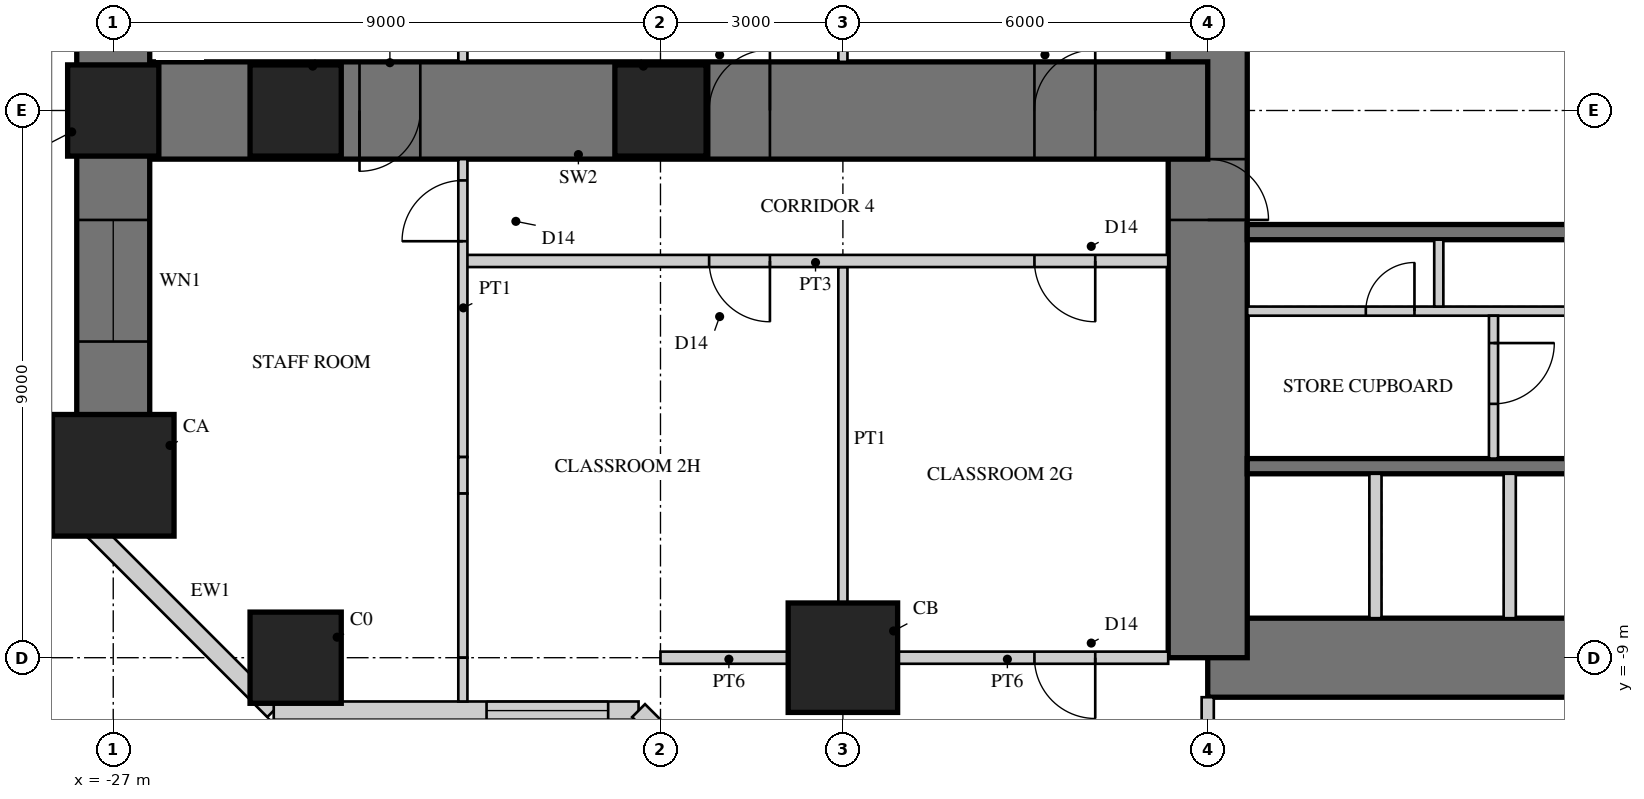
"""IFC4 building model, lengths in metres.
Left out: names, types, materials, properties, quantities, classifications, styles, units other than length and angle.
Written with IfcOpenShell. Run it as: python <this file> out.ifc"""

import sys

from ifc_helpers import new_model, si_unit, direction, frame, frame_2d, origin, origin_2d, place, context, subcontext, project, spatial, rectangle, hollow_rectangle, extrude, element, fill, save


model = new_model("IFC4")
c1 = context("Model", 3, precision=1e-05, world=origin(), true_north=direction((0.0, 1.0)))
c2 = subcontext(c1, "Body", "Model", "MODEL_VIEW")
j1 = project(units=[si_unit("LENGTHUNIT", "METRE"), si_unit("PLANEANGLEUNIT", "RADIAN")], contexts=[c1])
p1 = place(None, origin())
s1 = spatial("IfcSite", under=j1, at=p1, CompositionType="ELEMENT")
p2 = place(p1, origin())
s2 = spatial("IfcBuilding", under=s1, at=p2, CompositionType="ELEMENT")
p3 = place(p2, frame((0.0, 0.0, 9.5)))
s3 = spatial("IfcBuildingStorey", under=s2, at=p3, CompositionType="ELEMENT", Elevation=9.5)
p4 = place(p3, frame((-9.0, -9.0, 0.0), z_axis=(0.0, 0.0, 1.0), x_axis=(1.0, 0.0, 0.0)))
e1 = element("IfcWall", 1, at=p4, inside=s3, PredefinedType="SHEAR", context=c2, shape_type="SweptSolid", body=[
    extrude(rectangle(XDim=18.0, YDim=1.3, at=frame_2d((9.0, 0.0))), origin(), (0.0, 0.0, 1.0), 4.5),
])
p5 = place(p4, frame((9.8, 0.0, 0.0)))
e2 = element("IfcOpeningElement", 2, at=p5, cuts=e1, PredefinedType="OPENING", context=c2, shape_type="SweptSolid", body=[
    extrude(rectangle(XDim=1.0, YDim=2.4, at=frame_2d((0.5, 1.2))), frame((0.0, 0.66, 0.0), z_axis=(0.0, -1.0, 0.0), x_axis=(1.0, 0.0, 0.0)), (0.0, 0.0, 1.0), 1.32),
])
p6 = place(p3, frame((-9.0, 9.0, 0.0), z_axis=(0.0, 0.0, 1.0), x_axis=(0.0, -1.0, 0.0)))
e3 = element("IfcWall", 3, at=p6, inside=s3, PredefinedType="SHEAR", context=c2, shape_type="SweptSolid", body=[
    extrude(rectangle(XDim=18.0, YDim=1.3, at=frame_2d((9.0, 0.0))), origin(), (0.0, 0.0, 1.0), 4.5),
])
p7 = place(p6, frame((9.8, 0.0, 0.0)))
e4 = element("IfcOpeningElement", 4, at=p7, cuts=e3, PredefinedType="OPENING", context=c2, shape_type="SweptSolid", body=[
    extrude(rectangle(XDim=1.0, YDim=2.4, at=frame_2d((0.5, 1.2))), frame((0.0, 0.66, 0.0), z_axis=(0.0, -1.0, 0.0), x_axis=(1.0, 0.0, 0.0)), (0.0, 0.0, 1.0), 1.32),
])
for number, where, z_axis, x_axis in (
    (5, (-1.925, -2.0, 0.0), (0.0, 0.0, 1.0), (-1.0, 0.0, 0.0)),
    (6, (-1.925, -5.85, 0.0), (0.0, 0.0, 1.0), (-1.0, 0.0, 0.0)),
):
    element("IfcWall", number, at=place(p3, frame(where, z_axis=z_axis, x_axis=x_axis)), inside=s3, PredefinedType="SHEAR", context=c2, shape_type="SweptSolid", body=[
        extrude(rectangle(XDim=6.425, YDim=0.25, at=frame_2d((3.212, 0.0))), origin(), (0.0, 0.0, 1.0), 4.5),
    ])
p8 = place(p3, frame((-1.925, -3.3, 0.0), z_axis=(0.0, 0.0, 1.0), x_axis=(-1.0, 0.0, 0.0)))
e7 = element("IfcWall", 7, at=p8, inside=s3, PredefinedType="PARTITIONING", context=c2, shape_type="SweptSolid", body=[
    extrude(rectangle(XDim=6.425, YDim=0.15, at=frame_2d((3.212, 0.0))), origin(), (0.0, 0.0, 1.0), 4.5),
])
p9 = place(p8, frame((0.075, 0.0, 0.0)))
e8 = element("IfcOpeningElement", 8, at=p9, cuts=e7, PredefinedType="OPENING", context=c2, shape_type="SweptSolid", body=[
    extrude(rectangle(XDim=0.8, YDim=2.1, at=frame_2d((0.4, 1.05))), frame((0.0, 0.085, 0.0), z_axis=(0.0, -1.0, 0.0), x_axis=(1.0, 0.0, 0.0)), (0.0, 0.0, 1.0), 0.17),
])
p10 = place(p8, frame((3.675, 0.0, 0.0)))
e9 = element("IfcOpeningElement", 9, at=p10, cuts=e7, PredefinedType="OPENING", context=c2, shape_type="SweptSolid", body=[
    extrude(rectangle(XDim=0.8, YDim=2.1, at=frame_2d((0.4, 1.05))), frame((0.0, 0.085, 0.0), z_axis=(0.0, -1.0, 0.0), x_axis=(1.0, 0.0, 0.0)), (0.0, 0.0, 1.0), 0.17),
])
p11 = place(p3, frame((-5.2, -2.125, 0.0), z_axis=(0.0, 0.0, 1.0), x_axis=(0.0, -1.0, 0.0)))
e10 = element("IfcWall", 10, at=p11, inside=s3, PredefinedType="PARTITIONING", context=c2, shape_type="SweptSolid", body=[
    extrude(rectangle(XDim=1.1, YDim=0.15, at=frame_2d((0.55, 0.0))), origin(), (0.0, 0.0, 1.0), 4.5),
])
for number, where, z_axis, x_axis in (
    (11, (-4.033, -5.975, 0.0), (0.0, 0.0, 1.0), (0.0, -1.0, 0.0)),
    (12, (-6.242, -5.975, 0.0), (0.0, 0.0, 1.0), (0.0, -1.0, 0.0)),
):
    element("IfcWall", number, at=place(p3, frame(where, z_axis=z_axis, x_axis=x_axis)), inside=s3, PredefinedType="PARTITIONING", context=c2, shape_type="SweptSolid", body=[
        extrude(rectangle(XDim=2.375, YDim=0.2, at=frame_2d((1.188, 0.0))), origin(), (0.0, 0.0, 1.0), 4.5),
    ])
p12 = place(p3, frame((-9.0, 0.0, 0.0), z_axis=(0.0, 0.0, 1.0), x_axis=(-1.0, 0.0, 0.0)))
e13 = element("IfcWall", 13, at=p12, inside=s3, PredefinedType="SHEAR", context=c2, shape_type="SweptSolid", body=[
    extrude(rectangle(XDim=18.0, YDim=1.6, at=frame_2d((9.0, 0.0))), origin(), (0.0, 0.0, 1.0), 4.5),
])
p13 = place(p12, frame((1.85, 0.0, 0.0)))
e14 = element("IfcOpeningElement", 14, at=p13, cuts=e13, PredefinedType="OPENING", context=c2, shape_type="SweptSolid", body=[
    extrude(rectangle(XDim=1.0, YDim=2.2, at=frame_2d((0.5, 1.1))), frame((0.0, 0.81, 0.0), z_axis=(0.0, -1.0, 0.0), x_axis=(1.0, 0.0, 0.0)), (0.0, 0.0, 1.0), 1.62),
])
p14 = place(p12, frame((7.2, 0.0, 0.0)))
e15 = element("IfcOpeningElement", 15, at=p14, cuts=e13, PredefinedType="OPENING", context=c2, shape_type="SweptSolid", body=[
    extrude(rectangle(XDim=1.0, YDim=2.2, at=frame_2d((0.5, 1.1))), frame((0.0, 0.81, 0.0), z_axis=(0.0, -1.0, 0.0), x_axis=(1.0, 0.0, 0.0)), (0.0, 0.0, 1.0), 1.62),
])
p15 = place(p12, frame((12.95, 0.0, 0.0)))
e16 = element("IfcOpeningElement", 16, at=p15, cuts=e13, PredefinedType="OPENING", context=c2, shape_type="SweptSolid", body=[
    extrude(rectangle(XDim=1.0, YDim=2.2, at=frame_2d((0.5, 1.1))), frame((0.0, 0.81, 0.0), z_axis=(0.0, -1.0, 0.0), x_axis=(1.0, 0.0, 0.0)), (0.0, 0.0, 1.0), 1.62),
])
p16 = place(p3, frame((-27.0, 6.0, 0.0), z_axis=(0.0, 0.0, 1.0), x_axis=(0.0, -1.0, 0.0)))
e17 = element("IfcWall", 17, at=p16, inside=s3, PredefinedType="SHEAR", context=c2, shape_type="SweptSolid", body=[
    extrude(rectangle(XDim=12.0, YDim=1.2, at=frame_2d((6.0, 0.0))), origin(), (0.0, 0.0, 1.0), 4.5),
])
p17 = place(p16, frame((2.2, 0.0, 0.9)))
e18 = element("IfcOpeningElement", 18, at=p17, cuts=e17, PredefinedType="OPENING", context=c2, shape_type="SweptSolid", body=[
    extrude(rectangle(XDim=2.0, YDim=1.8, at=frame_2d((1.0, 0.9))), frame((0.0, 0.61, 0.0), z_axis=(0.0, -1.0, 0.0), x_axis=(1.0, 0.0, 0.0)), (0.0, 0.0, 1.0), 1.22),
])
p18 = place(p16, frame((7.8, 0.0, 0.9)))
e19 = element("IfcOpeningElement", 19, at=p18, cuts=e17, PredefinedType="OPENING", context=c2, shape_type="SweptSolid", body=[
    extrude(rectangle(XDim=2.0, YDim=1.8, at=frame_2d((1.0, 0.9))), frame((0.0, 0.61, 0.0), z_axis=(0.0, -1.0, 0.0), x_axis=(1.0, 0.0, 0.0)), (0.0, 0.0, 1.0), 1.22),
])
p19 = place(p3, frame((-15.0, -9.0, 0.0), z_axis=(0.0, 0.0, 1.0), x_axis=(1.0, 0.0, 0.0)))
e20 = element("IfcColumn", 20, at=p19, inside=s3, PredefinedType="COLUMN", context=c2, shape_type="SweptSolid", body=[
    extrude(rectangle(XDim=1.8, YDim=1.8, at=origin_2d()), origin(), (0.0, 0.0, 1.0), 4.5),
])
for number, where, z_axis, x_axis in (
    (21, (-24.0, -9.0, 0.0), (0.0, 0.0, 1.0), (1.0, 0.0, 0.0)),
    (22, (-27.0, 0.0, 0.0), (0.0, 0.0, 1.0), (1.0, 0.0, 0.0)),
):
    element("IfcColumn", number, at=place(p3, frame(where, z_axis=z_axis, x_axis=x_axis)), inside=s3, PredefinedType="COLUMN", context=c2, shape_type="SweptSolid", body=[
        extrude(rectangle(XDim=1.5, YDim=1.5, at=origin_2d()), origin(), (0.0, 0.0, 1.0), 4.5),
    ])
p20 = place(p3, frame((-27.0, -6.0, 0.0), z_axis=(0.0, 0.0, 1.0), x_axis=(1.0, 0.0, 0.0)))
e23 = element("IfcColumn", 23, at=p20, inside=s3, PredefinedType="COLUMN", context=c2, shape_type="SweptSolid", body=[
    extrude(rectangle(XDim=2.0, YDim=2.0, at=origin_2d()), origin(), (0.0, 0.0, 1.0), 4.5),
])
for number, where, z_axis, x_axis in (
    (24, (-18.0, 0.0, 0.0), (0.0, 0.0, 1.0), (1.0, 0.0, 0.0)),
    (25, (-24.0, 0.0, 0.0), (0.0, 0.0, 1.0), (1.0, 0.0, 0.0)),
):
    element("IfcColumn", number, at=place(p3, frame(where, z_axis=z_axis, x_axis=x_axis)), inside=s3, PredefinedType="COLUMN", context=c2, shape_type="SweptSolid", body=[
        extrude(rectangle(XDim=1.5, YDim=1.5, at=origin_2d()), origin(), (0.0, 0.0, 1.0), 4.5),
    ])
p21 = place(p3, frame((-27.6, -6.63, 0.0), z_axis=(0.0, 0.0, 1.0), x_axis=(0.707106781187, -0.707106781187, 0.0)))
e26 = element("IfcWall", 26, at=p21, inside=s3, PredefinedType="SOLIDWALL", context=c2, shape_type="SweptSolid", body=[
    extrude(rectangle(XDim=4.582, YDim=0.3, at=frame_2d((2.291, 0.0))), origin(), (0.0, 0.0, 1.0), 4.3),
])
p22 = place(p3, frame((-24.36, -9.87, 0.0), z_axis=(0.0, 0.0, 1.0), x_axis=(1.0, 0.0, 0.0)))
e27 = element("IfcWall", 27, at=p22, inside=s3, PredefinedType="SOLIDWALL", context=c2, shape_type="SweptSolid", body=[
    extrude(rectangle(XDim=6.0, YDim=0.3, at=frame_2d((3.0, 0.0))), origin(), (0.0, 0.0, 1.0), 4.3),
])
p23 = place(p22, frame((3.5, 0.0, 0.9)))
e28 = element("IfcOpeningElement", 28, at=p23, cuts=e27, PredefinedType="OPENING", context=c2, shape_type="SweptSolid", body=[
    extrude(rectangle(XDim=2.0, YDim=1.8, at=frame_2d((1.0, 0.9))), frame((0.0, 0.16, 0.0), z_axis=(0.0, -1.0, 0.0), x_axis=(1.0, 0.0, 0.0)), (0.0, 0.0, 1.0), 0.32),
])
p24 = place(p3, frame((-18.36, -9.87, 0.0), z_axis=(0.0, 0.0, 1.0), x_axis=(0.707106781187, -0.707106781187, 0.0)))
e29 = element("IfcWall", 29, at=p24, inside=s3, PredefinedType="SOLIDWALL", context=c2, shape_type="SweptSolid", body=[
    extrude(rectangle(XDim=12.007, YDim=0.3, at=frame_2d((6.003, 0.0))), origin(), (0.0, 0.0, 1.0), 4.3),
])
p25 = place(p24, frame((0.501, 0.0, 0.9)))
e30 = element("IfcOpeningElement", 30, at=p25, cuts=e29, PredefinedType="OPENING", context=c2, shape_type="SweptSolid", body=[
    extrude(rectangle(XDim=2.0, YDim=1.8, at=frame_2d((1.0, 0.9))), frame((0.0, 0.16, 0.0), z_axis=(0.0, -1.0, 0.0), x_axis=(1.0, 0.0, 0.0)), (0.0, 0.0, 1.0), 0.32),
])
p26 = place(p24, frame((9.506, 0.0, 0.9)))
e31 = element("IfcOpeningElement", 31, at=p26, cuts=e29, PredefinedType="OPENING", context=c2, shape_type="SweptSolid", body=[
    extrude(rectangle(XDim=2.0, YDim=1.8, at=frame_2d((1.0, 0.9))), frame((0.0, 0.16, 0.0), z_axis=(0.0, -1.0, 0.0), x_axis=(1.0, 0.0, 0.0)), (0.0, 0.0, 1.0), 0.32),
])
p27 = place(p3, frame((-4.3, -3.375, 0.0), z_axis=(0.0, 0.0, 1.0), x_axis=(0.0, -1.0, 0.0)))
e32 = element("IfcWall", 32, at=p27, inside=s3, PredefinedType="PARTITIONING", context=c2, shape_type="SweptSolid", body=[
    extrude(rectangle(XDim=2.35, YDim=0.15, at=frame_2d((1.175, 0.0))), origin(), (0.0, 0.0, 1.0), 4.3),
])
p28 = place(p27, frame((0.45, 0.0, 0.0)))
e33 = element("IfcOpeningElement", 33, at=p28, cuts=e32, PredefinedType="OPENING", context=c2, shape_type="SweptSolid", body=[
    extrude(rectangle(XDim=1.0, YDim=2.1, at=frame_2d((0.5, 1.05))), frame((0.0, 0.085, 0.0), z_axis=(0.0, -1.0, 0.0), x_axis=(1.0, 0.0, 0.0)), (0.0, 0.0, 1.0), 0.17),
])
p29 = place(p3, frame((-15.0, -2.575, 0.0), z_axis=(0.0, 0.0, 1.0), x_axis=(0.0, -1.0, 0.0)))
e34 = element("IfcWall", 34, at=p29, inside=s3, PredefinedType="PARTITIONING", context=c2, shape_type="SweptSolid", body=[
    extrude(rectangle(XDim=5.675, YDim=0.15, at=frame_2d((2.837, 0.0))), origin(), (0.0, 0.0, 1.0), 3.35),
])
p30 = place(p3, frame((-15.0, 8.25, 0.0), z_axis=(0.0, 0.0, 1.0), x_axis=(0.0, -1.0, 0.0)))
e35 = element("IfcWall", 35, at=p30, inside=s3, PredefinedType="PARTITIONING", context=c2, shape_type="SweptSolid", body=[
    extrude(rectangle(XDim=7.45, YDim=0.15, at=frame_2d((3.725, 0.0))), origin(), (0.0, 0.0, 1.0), 3.35),
])
p31 = place(p3, frame((-9.65, -2.475, 0.0), z_axis=(0.0, 0.0, 1.0), x_axis=(-1.0, 0.0, 0.0)))
e36 = element("IfcWall", 36, at=p31, inside=s3, PredefinedType="SOLIDWALL", context=c2, shape_type="SweptSolid", body=[
    extrude(rectangle(XDim=11.6, YDim=0.2, at=frame_2d((5.8, 0.0))), origin(), (0.0, 0.0, 1.0), 4.3),
])
p32 = place(p31, frame((1.2, 0.0, 0.0)))
e37 = element("IfcOpeningElement", 37, at=p32, cuts=e36, PredefinedType="OPENING", context=c2, shape_type="SweptSolid", body=[
    extrude(rectangle(XDim=1.0, YDim=2.2, at=frame_2d((0.5, 1.1))), frame((0.0, 0.11, 0.0), z_axis=(0.0, -1.0, 0.0), x_axis=(1.0, 0.0, 0.0)), (0.0, 0.0, 1.0), 0.22),
])
p33 = place(p31, frame((6.55, 0.0, 0.0)))
e38 = element("IfcOpeningElement", 38, at=p33, cuts=e36, PredefinedType="OPENING", context=c2, shape_type="SweptSolid", body=[
    extrude(rectangle(XDim=1.0, YDim=2.2, at=frame_2d((0.5, 1.1))), frame((0.0, 0.11, 0.0), z_axis=(0.0, -1.0, 0.0), x_axis=(1.0, 0.0, 0.0)), (0.0, 0.0, 1.0), 0.22),
])
p34 = place(p3, frame((-21.25, 5.7, 0.0), z_axis=(0.0, 0.0, 1.0), x_axis=(0.0, -1.0, 0.0)))
e39 = element("IfcWall", 39, at=p34, inside=s3, PredefinedType="PARTITIONING", context=c2, shape_type="SweptSolid", body=[
    extrude(rectangle(XDim=4.9, YDim=0.15, at=frame_2d((2.45, 0.0))), origin(), (0.0, 0.0, 1.0), 3.35),
])
p35 = place(p3, frame((-21.25, -0.8, 0.0), z_axis=(0.0, 0.0, 1.0), x_axis=(0.0, -1.0, 0.0)))
e40 = element("IfcWall", 40, at=p35, inside=s3, PredefinedType="PARTITIONING", context=c2, shape_type="SweptSolid", body=[
    extrude(rectangle(XDim=4.9, YDim=0.15, at=frame_2d((2.45, 0.0))), origin(), (0.0, 0.0, 1.0), 3.35),
])
p36 = place(p35, frame((0.35, 0.0, 0.0)))
e41 = element("IfcOpeningElement", 41, at=p36, cuts=e40, PredefinedType="OPENING", context=c2, shape_type="SweptSolid", body=[
    extrude(rectangle(XDim=1.0, YDim=2.2, at=frame_2d((0.5, 1.1))), frame((0.0, 0.085, 0.0), z_axis=(0.0, -1.0, 0.0), x_axis=(1.0, 0.0, 0.0)), (0.0, 0.0, 1.0), 0.17),
])
p37 = place(p3, frame((-21.25, -5.7, 0.0), z_axis=(0.0, 0.0, 1.0), x_axis=(0.0, -1.0, 0.0)))
e42 = element("IfcWall", 42, at=p37, inside=s3, PredefinedType="PARTITIONING", context=c2, shape_type="SweptSolid", body=[
    extrude(rectangle(XDim=0.6, YDim=0.15, at=frame_2d((0.3, 0.0))), origin(), (0.0, 0.0, 1.0), 4.3),
])
p38 = place(p3, frame((-21.25, -6.3, 0.0), z_axis=(0.0, 0.0, 1.0), x_axis=(0.0, -1.0, 0.0)))
e43 = element("IfcWall", 43, at=p38, inside=s3, PredefinedType="PARTITIONING", context=c2, shape_type="SweptSolid", body=[
    extrude(rectangle(XDim=2.7, YDim=0.15, at=frame_2d((1.35, 0.0))), origin(), (0.0, 0.0, 1.0), 3.35),
])
p39 = place(p3, frame((-21.25, -9.0, 0.0), z_axis=(0.0, 0.0, 1.0), x_axis=(0.0, -1.0, 0.0)))
e44 = element("IfcWall", 44, at=p39, inside=s3, PredefinedType="PARTITIONING", context=c2, shape_type="SweptSolid", body=[
    extrude(rectangle(XDim=0.72, YDim=0.15, at=frame_2d((0.36, 0.0))), origin(), (0.0, 0.0, 1.0), 4.3),
])
p40 = place(p3, frame((-9.65, -9.0, 0.0), z_axis=(0.0, 0.0, 1.0), x_axis=(-1.0, 0.0, 0.0)))
e45 = element("IfcWall", 45, at=p40, inside=s3, PredefinedType="SOLIDWALL", context=c2, shape_type="SweptSolid", body=[
    extrude(rectangle(XDim=4.6, YDim=0.2, at=frame_2d((2.3, 0.0))), origin(), (0.0, 0.0, 1.0), 3.3),
])
p41 = place(p40, frame((1.2, 0.0, 0.0)))
e46 = element("IfcOpeningElement", 46, at=p41, cuts=e45, PredefinedType="OPENING", context=c2, shape_type="SweptSolid", body=[
    extrude(rectangle(XDim=1.0, YDim=2.2, at=frame_2d((0.5, 1.1))), frame((0.0, 0.11, 0.0), z_axis=(0.0, -1.0, 0.0), x_axis=(1.0, 0.0, 0.0)), (0.0, 0.0, 1.0), 0.22),
])
p42 = place(p3, frame((-15.75, -9.0, 0.0), z_axis=(0.0, 0.0, 1.0), x_axis=(-1.0, 0.0, 0.0)))
e47 = element("IfcWall", 47, at=p42, inside=s3, PredefinedType="SOLIDWALL", context=c2, shape_type="SweptSolid", body=[
    extrude(rectangle(XDim=2.25, YDim=0.2, at=frame_2d((1.125, 0.0))), origin(), (0.0, 0.0, 1.0), 3.3),
])
p43 = place(p3, frame((-9.0, -14.25, 0.0), z_axis=(0.0, 0.0, 1.0), x_axis=(0.0, 1.0, 0.0)))
e48 = element("IfcWall", 48, at=p43, inside=s3, PredefinedType="SOLIDWALL", context=c2, shape_type="SweptSolid", body=[
    extrude(rectangle(XDim=4.6, YDim=0.2, at=frame_2d((2.3, 0.0))), origin(), (0.0, 0.0, 1.0), 3.3),
])
p44 = place(p18, origin())
e49 = element("IfcWindow", 49, at=p44, inside=s3, PartitioningType="SINGLE_PANEL", PredefinedType="WINDOW", context=c2, shape_type="SweptSolid", body=[
    extrude(hollow_rectangle(XDim=2.0, YDim=1.8, WallThickness=0.06, at=frame_2d((1.0, 0.9))), frame((0.0, 0.03, 0.0), z_axis=(0.0, -1.0, 0.0), x_axis=(1.0, 0.0, 0.0)), (0.0, 0.0, 1.0), 0.06),
    extrude(rectangle(XDim=1.879, YDim=1.679, at=frame_2d((1.0, 0.9))), frame((0.0, 0.03, 0.0), z_axis=(0.0, -1.0, 0.0), x_axis=(1.0, 0.0, 0.0)), (0.0, 0.0, 1.0), 0.06),
])
fill(e19, e49)
p45 = place(p23, origin())
e50 = element("IfcWindow", 50, at=p45, inside=s3, PartitioningType="SINGLE_PANEL", PredefinedType="WINDOW", context=c2, shape_type="SweptSolid", body=[
    extrude(hollow_rectangle(XDim=2.0, YDim=1.8, WallThickness=0.06, at=frame_2d((1.0, 0.9))), frame((0.0, 0.03, 0.0), z_axis=(0.0, -1.0, 0.0), x_axis=(1.0, 0.0, 0.0)), (0.0, 0.0, 1.0), 0.06),
    extrude(rectangle(XDim=1.879, YDim=1.679, at=frame_2d((1.0, 0.9))), frame((0.0, 0.03, 0.0), z_axis=(0.0, -1.0, 0.0), x_axis=(1.0, 0.0, 0.0)), (0.0, 0.0, 1.0), 0.06),
])
fill(e28, e50)
p46 = place(p28, origin())
e51 = element("IfcDoor", 51, at=p46, inside=s3, OperationType="SINGLE_SWING_LEFT", PredefinedType="DOOR", context=c2, shape_type="SweptSolid", body=[
    extrude(rectangle(XDim=1.0, YDim=2.1, at=frame_2d((0.5, 1.05))), frame((0.0, 0.025, 0.0), z_axis=(0.0, -1.0, 0.0), x_axis=(1.0, 0.0, 0.0)), (0.0, 0.0, 1.0), 0.05),
])
fill(e33, e51)
p47 = place(p32, origin())
e52 = element("IfcDoor", 52, at=p47, inside=s3, OperationType="SINGLE_SWING_LEFT", PredefinedType="DOOR", context=c2, shape_type="SweptSolid", body=[
    extrude(rectangle(XDim=1.0, YDim=2.2, at=frame_2d((0.5, 1.1))), frame((0.0, 0.025, 0.0), z_axis=(0.0, -1.0, 0.0), x_axis=(1.0, 0.0, 0.0)), (0.0, 0.0, 1.0), 0.05),
])
fill(e37, e52)
p48 = place(p33, origin())
e53 = element("IfcDoor", 53, at=p48, inside=s3, OperationType="SINGLE_SWING_LEFT", PredefinedType="DOOR", context=c2, shape_type="SweptSolid", body=[
    extrude(rectangle(XDim=1.0, YDim=2.2, at=frame_2d((0.5, 1.1))), frame((0.0, 0.025, 0.0), z_axis=(0.0, -1.0, 0.0), x_axis=(1.0, 0.0, 0.0)), (0.0, 0.0, 1.0), 0.05),
])
fill(e38, e53)
p49 = place(p36, frame((1.0, 0.0, 0.0), z_axis=(0.0, 0.0, 1.0), x_axis=(-1.0, 0.0, 0.0)))
e54 = element("IfcDoor", 54, at=p49, inside=s3, OperationType="SINGLE_SWING_LEFT", PredefinedType="DOOR", context=c2, shape_type="SweptSolid", body=[
    extrude(rectangle(XDim=1.0, YDim=2.2, at=frame_2d((0.5, 1.1))), frame((0.0, 0.025, 0.0), z_axis=(0.0, -1.0, 0.0), x_axis=(1.0, 0.0, 0.0)), (0.0, 0.0, 1.0), 0.05),
])
fill(e41, e54)
p50 = place(p41, origin())
e55 = element("IfcDoor", 55, at=p50, inside=s3, OperationType="SINGLE_SWING_LEFT", PredefinedType="DOOR", context=c2, shape_type="SweptSolid", body=[
    extrude(rectangle(XDim=1.0, YDim=2.2, at=frame_2d((0.5, 1.1))), frame((0.0, 0.025, 0.0), z_axis=(0.0, -1.0, 0.0), x_axis=(1.0, 0.0, 0.0)), (0.0, 0.0, 1.0), 0.05),
])
fill(e46, e55)
p51 = place(p13, frame((1.0, 0.0, 0.0), z_axis=(0.0, 0.0, 1.0), x_axis=(-1.0, 0.0, 0.0)))
e56 = element("IfcDoor", 56, at=p51, inside=s3, OperationType="SINGLE_SWING_RIGHT", PredefinedType="DOOR", context=c2, shape_type="SweptSolid", body=[
    extrude(rectangle(XDim=1.0, YDim=2.2, at=frame_2d((0.5, 1.1))), frame((0.0, 0.025, 0.0), z_axis=(0.0, -1.0, 0.0), x_axis=(1.0, 0.0, 0.0)), (0.0, 0.0, 1.0), 0.05),
])
fill(e14, e56)
p52 = place(p14, frame((1.0, 0.0, 0.0), z_axis=(0.0, 0.0, 1.0), x_axis=(-1.0, 0.0, 0.0)))
e57 = element("IfcDoor", 57, at=p52, inside=s3, OperationType="SINGLE_SWING_RIGHT", PredefinedType="DOOR", context=c2, shape_type="SweptSolid", body=[
    extrude(rectangle(XDim=1.0, YDim=2.2, at=frame_2d((0.5, 1.1))), frame((0.0, 0.025, 0.0), z_axis=(0.0, -1.0, 0.0), x_axis=(1.0, 0.0, 0.0)), (0.0, 0.0, 1.0), 0.05),
])
fill(e15, e57)
p53 = place(p15, origin())
e58 = element("IfcDoor", 58, at=p53, inside=s3, OperationType="SINGLE_SWING_RIGHT", PredefinedType="DOOR", context=c2, shape_type="SweptSolid", body=[
    extrude(rectangle(XDim=1.0, YDim=2.2, at=frame_2d((0.5, 1.1))), frame((0.0, 0.025, 0.0), z_axis=(0.0, -1.0, 0.0), x_axis=(1.0, 0.0, 0.0)), (0.0, 0.0, 1.0), 0.05),
])
fill(e16, e58)
p54 = place(p7, origin())
e59 = element("IfcDoor", 59, at=p54, inside=s3, OperationType="SINGLE_SWING_RIGHT", PredefinedType="DOOR", context=c2, shape_type="SweptSolid", body=[
    extrude(rectangle(XDim=1.0, YDim=2.4, at=frame_2d((0.5, 1.2))), frame((0.0, 0.055, 0.0), z_axis=(0.0, -1.0, 0.0), x_axis=(1.0, 0.0, 0.0)), (0.0, 0.0, 1.0), 0.05),
])
fill(e4, e59)
p55 = place(p10, frame((0.8, 0.0, 0.0), z_axis=(0.0, 0.0, 1.0), x_axis=(-1.0, 0.0, 0.0)))
e60 = element("IfcDoor", 60, at=p55, inside=s3, OperationType="SINGLE_SWING_RIGHT", PredefinedType="DOOR", context=c2, shape_type="SweptSolid", body=[
    extrude(rectangle(XDim=0.8, YDim=2.1, at=frame_2d((0.4, 1.05))), frame((0.0, 0.025, 0.0), z_axis=(0.0, -1.0, 0.0), x_axis=(1.0, 0.0, 0.0)), (0.0, 0.0, 1.0), 0.05),
])
fill(e9, e60)
save(model, sys.argv[1])
